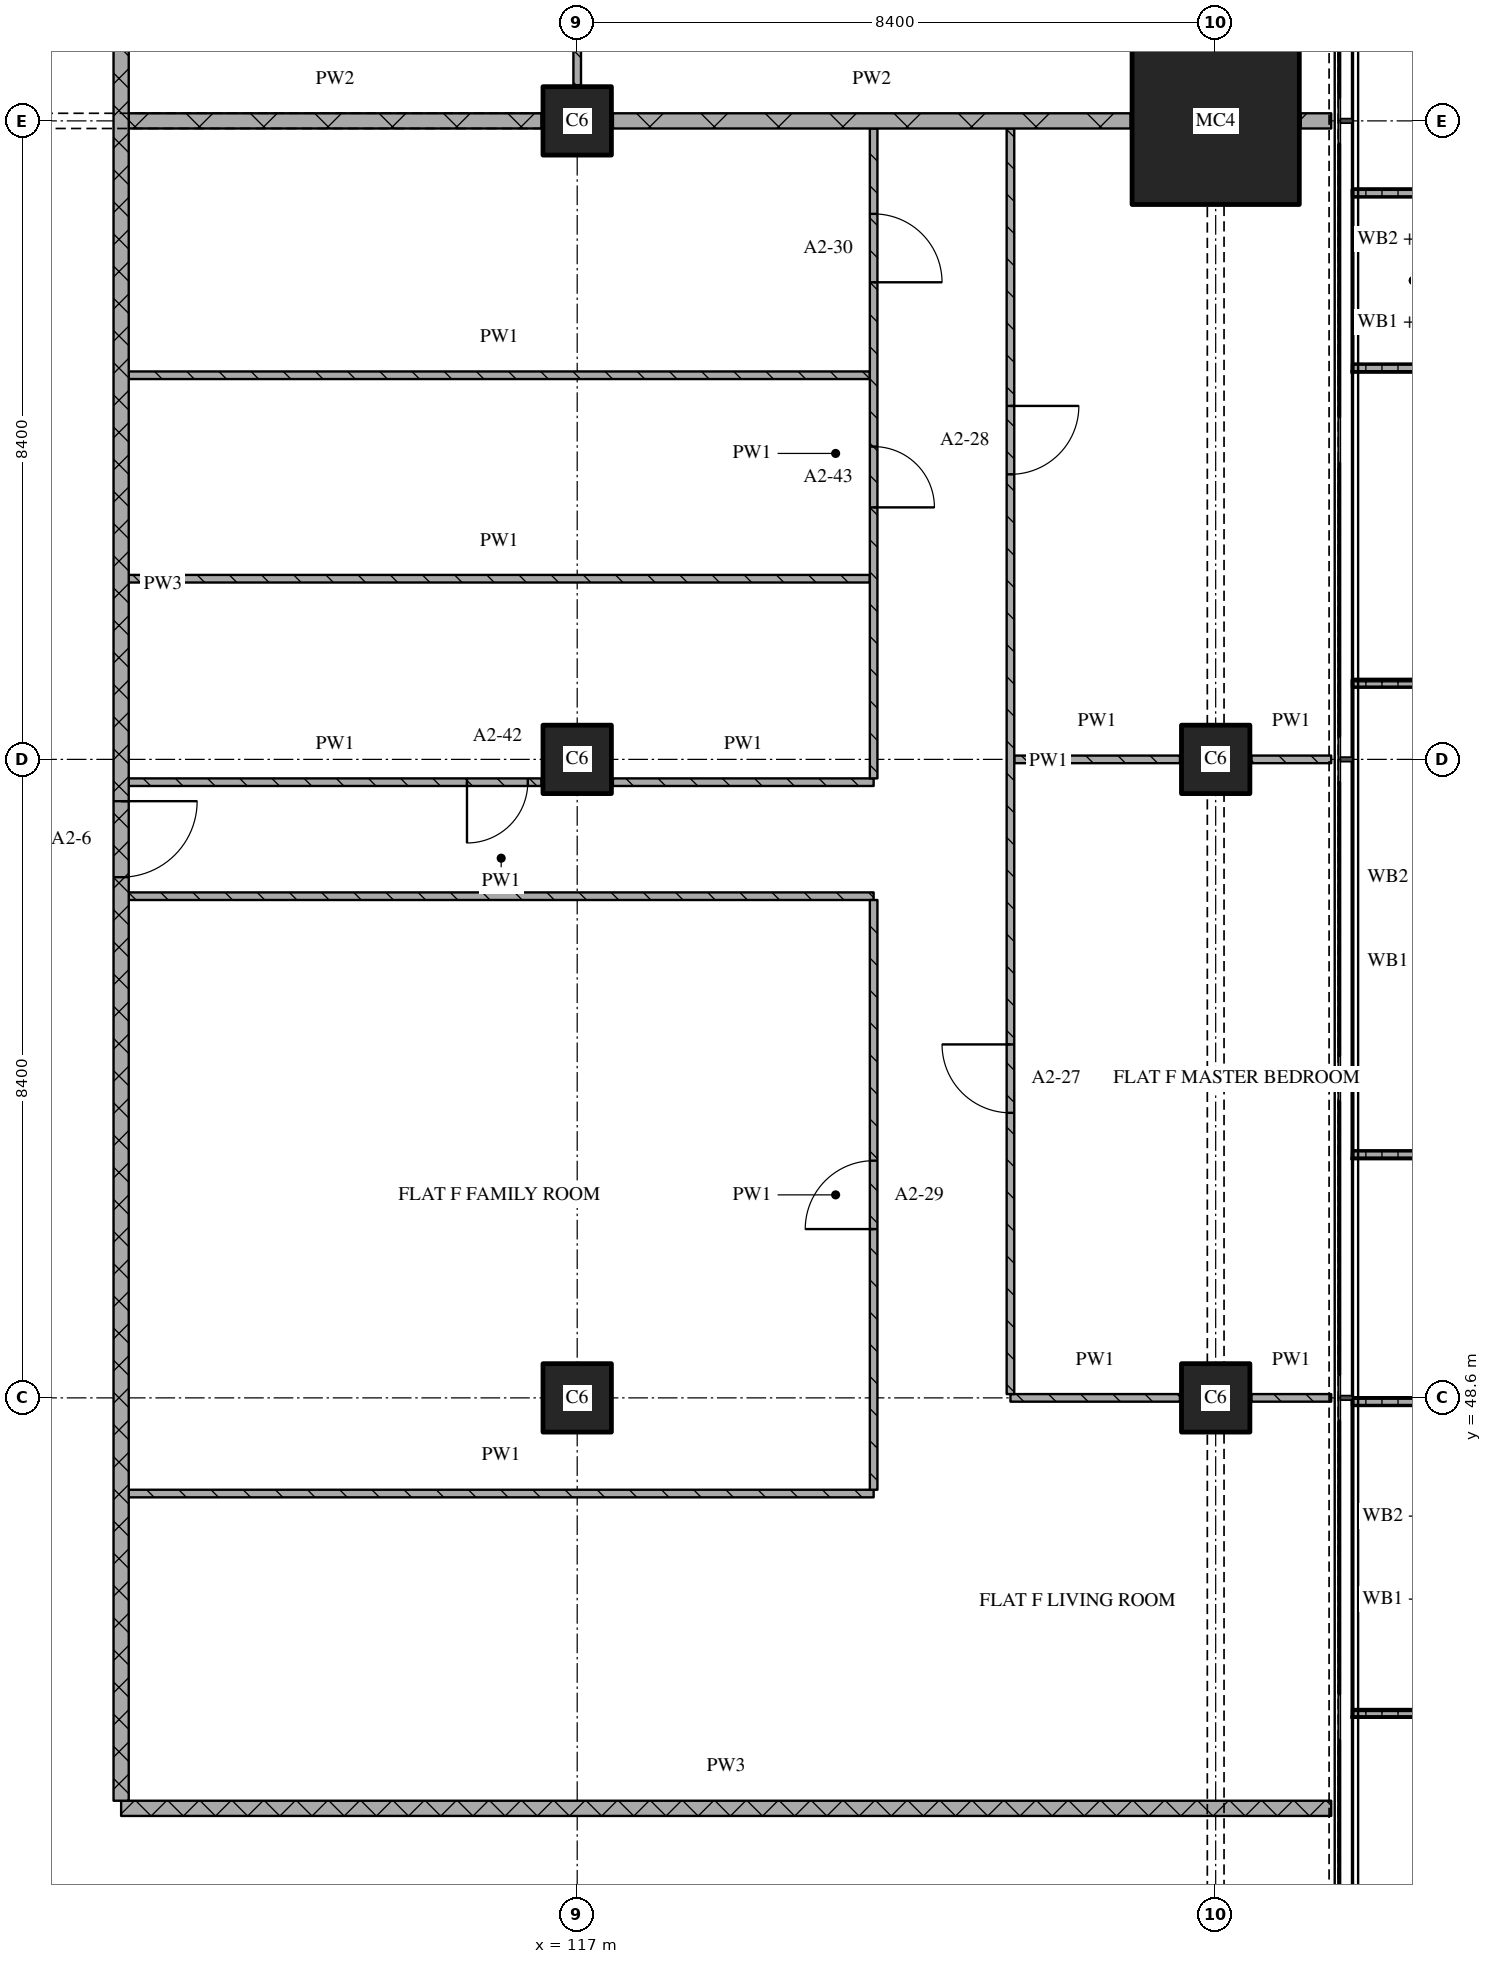
"""IFC4 building model, lengths in metres.
Left out: names, types, materials, properties, quantities, classifications, styles, units other than length and angle.
Written with IfcOpenShell. Run it as: python <this file> out.ifc"""

import sys

from ifc_helpers import new_model, si_unit, direction, frame, frame_2d, origin, origin_2d, place, context, subcontext, project, spatial, polyline, rectangle, outline, extrude, element, fill, save


model = new_model("IFC4")
c1 = context("Model", 3, precision=1e-05, world=origin(), true_north=direction((0.0, 1.0)))
c2 = subcontext(c1, "Body", "Model", "MODEL_VIEW")
j1 = project(units=[si_unit("LENGTHUNIT", "METRE"), si_unit("PLANEANGLEUNIT", "RADIAN")], contexts=[c1])
p1 = place(None, origin())
s1 = spatial("IfcSite", under=j1, at=p1, CompositionType="ELEMENT")
p2 = place(p1, origin())
s2 = spatial("IfcBuilding", under=s1, at=p2, CompositionType="ELEMENT")
p3 = place(p2, frame((0.0, 0.0, 48.0)))
s3 = spatial("IfcBuildingStorey", under=s2, at=p3, CompositionType="ELEMENT", Elevation=48.0)
for number, where, z_axis, x_axis in (
    (1, (117.0, 48.6, 0.0), (0.0, 0.0, 1.0), (1.0, 0.0, 0.0)),
    (2, (117.0, 57.0, 0.0), (0.0, 0.0, 1.0), (1.0, 0.0, 0.0)),
    (3, (117.0, 65.4, 0.0), (0.0, 0.0, 1.0), (1.0, 0.0, 0.0)),
    (4, (125.4, 48.6, 0.0), (0.0, 0.0, 1.0), (1.0, 0.0, 0.0)),
    (5, (125.4, 57.0, 0.0), (0.0, 0.0, 1.0), (1.0, 0.0, 0.0)),
):
    element("IfcColumn", number, at=place(p3, frame(where, z_axis=z_axis, x_axis=x_axis)), inside=s3, PredefinedType="COLUMN", context=c2, shape_type="SweptSolid", body=[
        extrude(rectangle(XDim=0.9, YDim=0.9, at=origin_2d()), origin(), (0.0, 0.0, 1.0), 3.6),
    ])
p4 = place(p3, frame((125.4, 65.4, 0.0), z_axis=(0.0, 0.0, 1.0), x_axis=(1.0, 0.0, 0.0)))
e6 = element("IfcColumn", 6, at=p4, inside=s3, PredefinedType="COLUMN", context=c2, shape_type="SweptSolid", body=[
    extrude(rectangle(XDim=2.2, YDim=2.2, at=origin_2d()), origin(), (0.0, 0.0, 1.0), 3.6),
])
p5 = place(p3, origin())
e7 = element("IfcWall", 7, at=p5, inside=s3, PredefinedType="SOLIDWALL", context=c2, shape_type="SweptSolid", body=[
    extrude(outline(polyline([(127.2, 44.4), (127.2, 44.5), (128.833, 44.5), (128.833, 48.5), (127.2, 48.5), (127.2, 48.6), (128.933, 48.6), (128.933, 44.4), (127.2, 44.4)])), origin(), (0.0, 0.0, 1.0), 1.0),
])
p6 = place(p3, origin())
e8 = element("IfcWall", 8, at=p6, inside=s3, PredefinedType="SOLIDWALL", context=c2, shape_type="SweptSolid", body=[
    extrude(outline(polyline([(127.2, 51.75), (127.2, 51.85), (128.967, 51.85), (128.967, 57.95), (127.2, 57.95), (127.2, 58.05), (129.067, 58.05), (129.067, 51.75), (127.2, 51.75)])), origin(), (0.0, 0.0, 1.0), 1.0),
])
p7 = place(p3, origin())
e9 = element("IfcWall", 9, at=p7, inside=s3, PredefinedType="SOLIDWALL", context=c2, shape_type="SweptSolid", body=[
    extrude(outline(polyline([(127.2, 62.1), (127.2, 62.2), (128.7, 62.2), (128.7, 64.4), (127.2, 64.4), (127.2, 64.5), (128.8, 64.5), (128.8, 62.1), (127.2, 62.1)])), origin(), (0.0, 0.0, 1.0), 1.0),
])
p8 = place(p3, frame((111.0, 43.2, 0.0), z_axis=(0.0, 0.0, 1.0), x_axis=(1.0, 0.0, 0.0)))
e10 = element("IfcWall", 10, at=p8, inside=s3, PredefinedType="PARTITIONING", context=c2, shape_type="SweptSolid", body=[
    extrude(rectangle(XDim=15.92, YDim=0.2, at=frame_2d((7.96, 0.0))), origin(), (0.0, 0.0, 1.0), 3.32),
])
p9 = place(p3, frame((111.1, 47.341, 0.0), z_axis=(0.0, 0.0, 1.0), x_axis=(1.0, 0.0, 0.0)))
e11 = element("IfcWall", 11, at=p9, inside=s3, PredefinedType="PARTITIONING", context=c2, shape_type="SweptSolid", body=[
    extrude(rectangle(XDim=9.8, YDim=0.1, at=frame_2d((4.9, 0.0))), origin(), (0.0, 0.0, 1.0), 3.32),
])
p10 = place(p3, frame((122.7, 48.6, 0.0), z_axis=(0.0, 0.0, 1.0), x_axis=(1.0, 0.0, 0.0)))
e12 = element("IfcWall", 12, at=p10, inside=s3, PredefinedType="PARTITIONING", context=c2, shape_type="SweptSolid", body=[
    extrude(rectangle(XDim=2.23, YDim=0.1, at=frame_2d((1.115, 0.0))), origin(), (0.0, 0.0, 1.0), 3.32),
])
p11 = place(p3, frame((125.87, 48.6, 0.0), z_axis=(0.0, 0.0, 1.0), x_axis=(1.0, 0.0, 0.0)))
e13 = element("IfcWall", 13, at=p11, inside=s3, PredefinedType="PARTITIONING", context=c2, shape_type="SweptSolid", body=[
    extrude(rectangle(XDim=1.05, YDim=0.1, at=frame_2d((0.525, 0.0))), origin(), (0.0, 0.0, 1.0), 3.32),
])
p12 = place(p3, frame((111.1, 55.2, 0.0), z_axis=(0.0, 0.0, 1.0), x_axis=(1.0, 0.0, 0.0)))
e14 = element("IfcWall", 14, at=p12, inside=s3, PredefinedType="PARTITIONING", context=c2, shape_type="SweptSolid", body=[
    extrude(rectangle(XDim=9.8, YDim=0.1, at=frame_2d((4.9, 0.0))), origin(), (0.0, 0.0, 1.0), 3.32),
])
p13 = place(p3, frame((111.1, 56.7, 0.0), z_axis=(0.0, 0.0, 1.0), x_axis=(1.0, 0.0, 0.0)))
e15 = element("IfcWall", 15, at=p13, inside=s3, PredefinedType="PARTITIONING", context=c2, shape_type="SweptSolid", body=[
    extrude(rectangle(XDim=5.43, YDim=0.1, at=frame_2d((2.715, 0.0))), origin(), (0.0, 0.0, 1.0), 3.32),
])
p14 = place(p13, frame((4.45, 0.0, 0.0)))
e16 = element("IfcOpeningElement", 16, at=p14, cuts=e15, PredefinedType="OPENING", context=c2, shape_type="SweptSolid", body=[
    extrude(rectangle(XDim=0.8, YDim=2.1, at=frame_2d((0.4, 1.05))), frame((0.0, 0.06, 0.0), z_axis=(0.0, -1.0, 0.0), x_axis=(1.0, 0.0, 0.0)), (0.0, 0.0, 1.0), 0.12),
])
p15 = place(p3, frame((117.47, 56.7, 0.0), z_axis=(0.0, 0.0, 1.0), x_axis=(1.0, 0.0, 0.0)))
e17 = element("IfcWall", 17, at=p15, inside=s3, PredefinedType="PARTITIONING", context=c2, shape_type="SweptSolid", body=[
    extrude(rectangle(XDim=3.43, YDim=0.1, at=frame_2d((1.715, 0.0))), origin(), (0.0, 0.0, 1.0), 3.32),
])
p16 = place(p3, frame((122.75, 57.0, 0.0), z_axis=(0.0, 0.0, 1.0), x_axis=(1.0, 0.0, 0.0)))
e18 = element("IfcWall", 18, at=p16, inside=s3, PredefinedType="PARTITIONING", context=c2, shape_type="SweptSolid", body=[
    extrude(rectangle(XDim=2.18, YDim=0.1, at=frame_2d((1.09, 0.0))), origin(), (0.0, 0.0, 1.0), 3.32),
])
p17 = place(p3, frame((125.87, 57.0, 0.0), z_axis=(0.0, 0.0, 1.0), x_axis=(1.0, 0.0, 0.0)))
e19 = element("IfcWall", 19, at=p17, inside=s3, PredefinedType="PARTITIONING", context=c2, shape_type="SweptSolid", body=[
    extrude(rectangle(XDim=1.05, YDim=0.1, at=frame_2d((0.525, 0.0))), origin(), (0.0, 0.0, 1.0), 3.32),
])
for number, where, z_axis, x_axis in (
    (20, (111.1, 59.377, 0.0), (0.0, 0.0, 1.0), (1.0, 0.0, 0.0)),
    (21, (111.1, 62.053, 0.0), (0.0, 0.0, 1.0), (1.0, 0.0, 0.0)),
):
    element("IfcWall", number, at=place(p3, frame(where, z_axis=z_axis, x_axis=x_axis)), inside=s3, PredefinedType="PARTITIONING", context=c2, shape_type="SweptSolid", body=[
        extrude(rectangle(XDim=9.75, YDim=0.1, at=frame_2d((4.875, 0.0))), origin(), (0.0, 0.0, 1.0), 3.32),
    ])
p18 = place(p3, frame((111.1, 65.4, 0.0), z_axis=(0.0, 0.0, 1.0), x_axis=(1.0, 0.0, 0.0)))
e22 = element("IfcWall", 22, at=p18, inside=s3, PredefinedType="PARTITIONING", context=c2, shape_type="SweptSolid", body=[
    extrude(rectangle(XDim=5.43, YDim=0.2, at=frame_2d((2.715, 0.0))), origin(), (0.0, 0.0, 1.0), 2.82),
])
p19 = place(p3, frame((117.47, 65.4, 0.0), z_axis=(0.0, 0.0, 1.0), x_axis=(1.0, 0.0, 0.0)))
e23 = element("IfcWall", 23, at=p19, inside=s3, PredefinedType="PARTITIONING", context=c2, shape_type="SweptSolid", body=[
    extrude(rectangle(XDim=6.81, YDim=0.2, at=frame_2d((3.405, 0.0))), origin(), (0.0, 0.0, 1.0), 3.32),
])
p20 = place(p3, frame((126.52, 65.4, 0.0), z_axis=(0.0, 0.0, 1.0), x_axis=(1.0, 0.0, 0.0)))
e24 = element("IfcWall", 24, at=p20, inside=s3, PredefinedType="PARTITIONING", context=c2, shape_type="SweptSolid", body=[
    extrude(rectangle(XDim=0.4, YDim=0.2, at=frame_2d((0.2, 0.0))), origin(), (0.0, 0.0, 1.0), 3.32),
])
p21 = place(p3, frame((111.0, 75.32, 0.0), z_axis=(0.0, 0.0, 1.0), x_axis=(0.0, -1.0, 0.0)))
e25 = element("IfcWall", 25, at=p21, inside=s3, PredefinedType="PARTITIONING", context=c2, shape_type="SweptSolid", body=[
    extrude(rectangle(XDim=32.02, YDim=0.2, at=frame_2d((16.01, 0.0))), origin(), (0.0, 0.0, 1.0), 3.32),
])
p22 = place(p21, frame((4.47, 0.0, 0.0)))
e26 = element("IfcOpeningElement", 26, at=p22, cuts=e25, PredefinedType="OPENING", context=c2, shape_type="SweptSolid", body=[
    extrude(rectangle(XDim=1.0, YDim=2.1, at=frame_2d((0.5, 1.05))), frame((0.0, 0.11, 0.0), z_axis=(0.0, -1.0, 0.0), x_axis=(1.0, 0.0, 0.0)), (0.0, 0.0, 1.0), 0.22),
])
p23 = place(p21, frame((18.87, 0.0, 0.0)))
e27 = element("IfcOpeningElement", 27, at=p23, cuts=e25, PredefinedType="OPENING", context=c2, shape_type="SweptSolid", body=[
    extrude(rectangle(XDim=1.0, YDim=2.1, at=frame_2d((0.5, 1.05))), frame((0.0, 0.11, 0.0), z_axis=(0.0, -1.0, 0.0), x_axis=(1.0, 0.0, 0.0)), (0.0, 0.0, 1.0), 0.22),
])
p24 = place(p3, frame((117.0, 65.87, 0.0), z_axis=(0.0, 0.0, 1.0), x_axis=(0.0, 1.0, 0.0)))
e28 = element("IfcWall", 28, at=p24, inside=s3, PredefinedType="PARTITIONING", context=c2, shape_type="SweptSolid", body=[
    extrude(rectangle(XDim=3.68, YDim=0.1, at=frame_2d((1.84, 0.0))), origin(), (0.0, 0.0, 1.0), 3.32),
])
p25 = place(p24, frame((1.23, 0.0, 0.0)))
e29 = element("IfcOpeningElement", 29, at=p25, cuts=e28, PredefinedType="OPENING", context=c2, shape_type="SweptSolid", body=[
    extrude(rectangle(XDim=0.8, YDim=2.1, at=frame_2d((0.4, 1.05))), frame((0.0, 0.06, 0.0), z_axis=(0.0, -1.0, 0.0), x_axis=(1.0, 0.0, 0.0)), (0.0, 0.0, 1.0), 0.12),
])
p26 = place(p3, frame((120.9, 47.391, 0.0), z_axis=(0.0, 0.0, 1.0), x_axis=(0.0, 1.0, 0.0)))
e30 = element("IfcWall", 30, at=p26, inside=s3, PredefinedType="PARTITIONING", context=c2, shape_type="SweptSolid", body=[
    extrude(rectangle(XDim=7.759, YDim=0.1, at=frame_2d((3.879, 0.0))), origin(), (0.0, 0.0, 1.0), 3.32),
])
p27 = place(p26, frame((3.429, 0.0, 0.0)))
e31 = element("IfcOpeningElement", 31, at=p27, cuts=e30, PredefinedType="OPENING", context=c2, shape_type="SweptSolid", body=[
    extrude(rectangle(XDim=0.9, YDim=2.1, at=frame_2d((0.45, 1.05))), frame((0.0, 0.06, 0.0), z_axis=(0.0, -1.0, 0.0), x_axis=(1.0, 0.0, 0.0)), (0.0, 0.0, 1.0), 0.12),
])
p28 = place(p3, frame((120.9, 56.75, 0.0), z_axis=(0.0, 0.0, 1.0), x_axis=(0.0, 1.0, 0.0)))
e32 = element("IfcWall", 32, at=p28, inside=s3, PredefinedType="PARTITIONING", context=c2, shape_type="SweptSolid", body=[
    extrude(rectangle(XDim=8.55, YDim=0.1, at=frame_2d((4.275, 0.0))), origin(), (0.0, 0.0, 1.0), 3.32),
])
p29 = place(p28, frame((3.565, 0.0, 0.0)))
e33 = element("IfcOpeningElement", 33, at=p29, cuts=e32, PredefinedType="OPENING", context=c2, shape_type="SweptSolid", body=[
    extrude(rectangle(XDim=0.8, YDim=2.1, at=frame_2d((0.4, 1.05))), frame((0.0, 0.06, 0.0), z_axis=(0.0, -1.0, 0.0), x_axis=(1.0, 0.0, 0.0)), (0.0, 0.0, 1.0), 0.12),
])
p30 = place(p28, frame((6.527, 0.0, 0.0)))
e34 = element("IfcOpeningElement", 34, at=p30, cuts=e32, PredefinedType="OPENING", context=c2, shape_type="SweptSolid", body=[
    extrude(rectangle(XDim=0.9, YDim=2.1, at=frame_2d((0.45, 1.05))), frame((0.0, 0.06, 0.0), z_axis=(0.0, -1.0, 0.0), x_axis=(1.0, 0.0, 0.0)), (0.0, 0.0, 1.0), 0.12),
])
p31 = place(p3, frame((122.7, 65.3, 0.0), z_axis=(0.0, 0.0, 1.0), x_axis=(0.0, -1.0, 0.0)))
e35 = element("IfcWall", 35, at=p31, inside=s3, PredefinedType="PARTITIONING", context=c2, shape_type="SweptSolid", body=[
    extrude(rectangle(XDim=16.65, YDim=0.1, at=frame_2d((8.325, 0.0))), origin(), (0.0, 0.0, 1.0), 3.32),
])
p32 = place(p31, frame((3.65, 0.0, 0.0)))
e36 = element("IfcOpeningElement", 36, at=p32, cuts=e35, PredefinedType="OPENING", context=c2, shape_type="SweptSolid", body=[
    extrude(rectangle(XDim=0.9, YDim=2.1, at=frame_2d((0.45, 1.05))), frame((0.0, 0.06, 0.0), z_axis=(0.0, -1.0, 0.0), x_axis=(1.0, 0.0, 0.0)), (0.0, 0.0, 1.0), 0.12),
])
p33 = place(p31, frame((12.05, 0.0, 0.0)))
e37 = element("IfcOpeningElement", 37, at=p33, cuts=e35, PredefinedType="OPENING", context=c2, shape_type="SweptSolid", body=[
    extrude(rectangle(XDim=0.9, YDim=2.1, at=frame_2d((0.45, 1.05))), frame((0.0, 0.06, 0.0), z_axis=(0.0, -1.0, 0.0), x_axis=(1.0, 0.0, 0.0)), (0.0, 0.0, 1.0), 0.12),
])
p34 = place(p14, origin())
e38 = element("IfcDoor", 38, at=p34, inside=s3, OperationType="SINGLE_SWING_RIGHT", PredefinedType="DOOR", context=c2, shape_type="SweptSolid", body=[
    extrude(rectangle(XDim=0.8, YDim=2.1, at=frame_2d((0.4, 1.05))), frame((0.0, 0.025, 0.0), z_axis=(0.0, -1.0, 0.0), x_axis=(1.0, 0.0, 0.0)), (0.0, 0.0, 1.0), 0.05),
])
fill(e16, e38)
p35 = place(p23, origin())
e39 = element("IfcDoor", 39, at=p35, inside=s3, OperationType="SINGLE_SWING_LEFT", PredefinedType="DOOR", context=c2, shape_type="SweptSolid", body=[
    extrude(rectangle(XDim=1.0, YDim=2.1, at=frame_2d((0.5, 1.05))), frame((0.0, 0.025, 0.0), z_axis=(0.0, -1.0, 0.0), x_axis=(1.0, 0.0, 0.0)), (0.0, 0.0, 1.0), 0.05),
])
fill(e27, e39)
p36 = place(p27, origin())
e40 = element("IfcDoor", 40, at=p36, inside=s3, OperationType="SINGLE_SWING_LEFT", PredefinedType="DOOR", context=c2, shape_type="SweptSolid", body=[
    extrude(rectangle(XDim=0.9, YDim=2.1, at=frame_2d((0.45, 1.05))), frame((0.0, 0.025, 0.0), z_axis=(0.0, -1.0, 0.0), x_axis=(1.0, 0.0, 0.0)), (0.0, 0.0, 1.0), 0.05),
])
fill(e31, e40)
p37 = place(p29, origin())
e41 = element("IfcDoor", 41, at=p37, inside=s3, OperationType="SINGLE_SWING_RIGHT", PredefinedType="DOOR", context=c2, shape_type="SweptSolid", body=[
    extrude(rectangle(XDim=0.8, YDim=2.1, at=frame_2d((0.4, 1.05))), frame((0.0, 0.025, 0.0), z_axis=(0.0, -1.0, 0.0), x_axis=(1.0, 0.0, 0.0)), (0.0, 0.0, 1.0), 0.05),
])
fill(e33, e41)
p38 = place(p30, origin())
e42 = element("IfcDoor", 42, at=p38, inside=s3, OperationType="SINGLE_SWING_RIGHT", PredefinedType="DOOR", context=c2, shape_type="SweptSolid", body=[
    extrude(rectangle(XDim=0.9, YDim=2.1, at=frame_2d((0.45, 1.05))), frame((0.0, 0.025, 0.0), z_axis=(0.0, -1.0, 0.0), x_axis=(1.0, 0.0, 0.0)), (0.0, 0.0, 1.0), 0.05),
])
fill(e34, e42)
p39 = place(p32, origin())
e43 = element("IfcDoor", 43, at=p39, inside=s3, OperationType="SINGLE_SWING_LEFT", PredefinedType="DOOR", context=c2, shape_type="SweptSolid", body=[
    extrude(rectangle(XDim=0.9, YDim=2.1, at=frame_2d((0.45, 1.05))), frame((0.0, 0.025, 0.0), z_axis=(0.0, -1.0, 0.0), x_axis=(1.0, 0.0, 0.0)), (0.0, 0.0, 1.0), 0.05),
])
fill(e36, e43)
p40 = place(p33, origin())
e44 = element("IfcDoor", 44, at=p40, inside=s3, OperationType="SINGLE_SWING_RIGHT", PredefinedType="DOOR", context=c2, shape_type="SweptSolid", body=[
    extrude(rectangle(XDim=0.9, YDim=2.1, at=frame_2d((0.45, 1.05))), frame((0.0, 0.025, 0.0), z_axis=(0.0, -1.0, 0.0), x_axis=(1.0, 0.0, 0.0)), (0.0, 0.0, 1.0), 0.05),
])
fill(e37, e44)
save(model, sys.argv[1])
